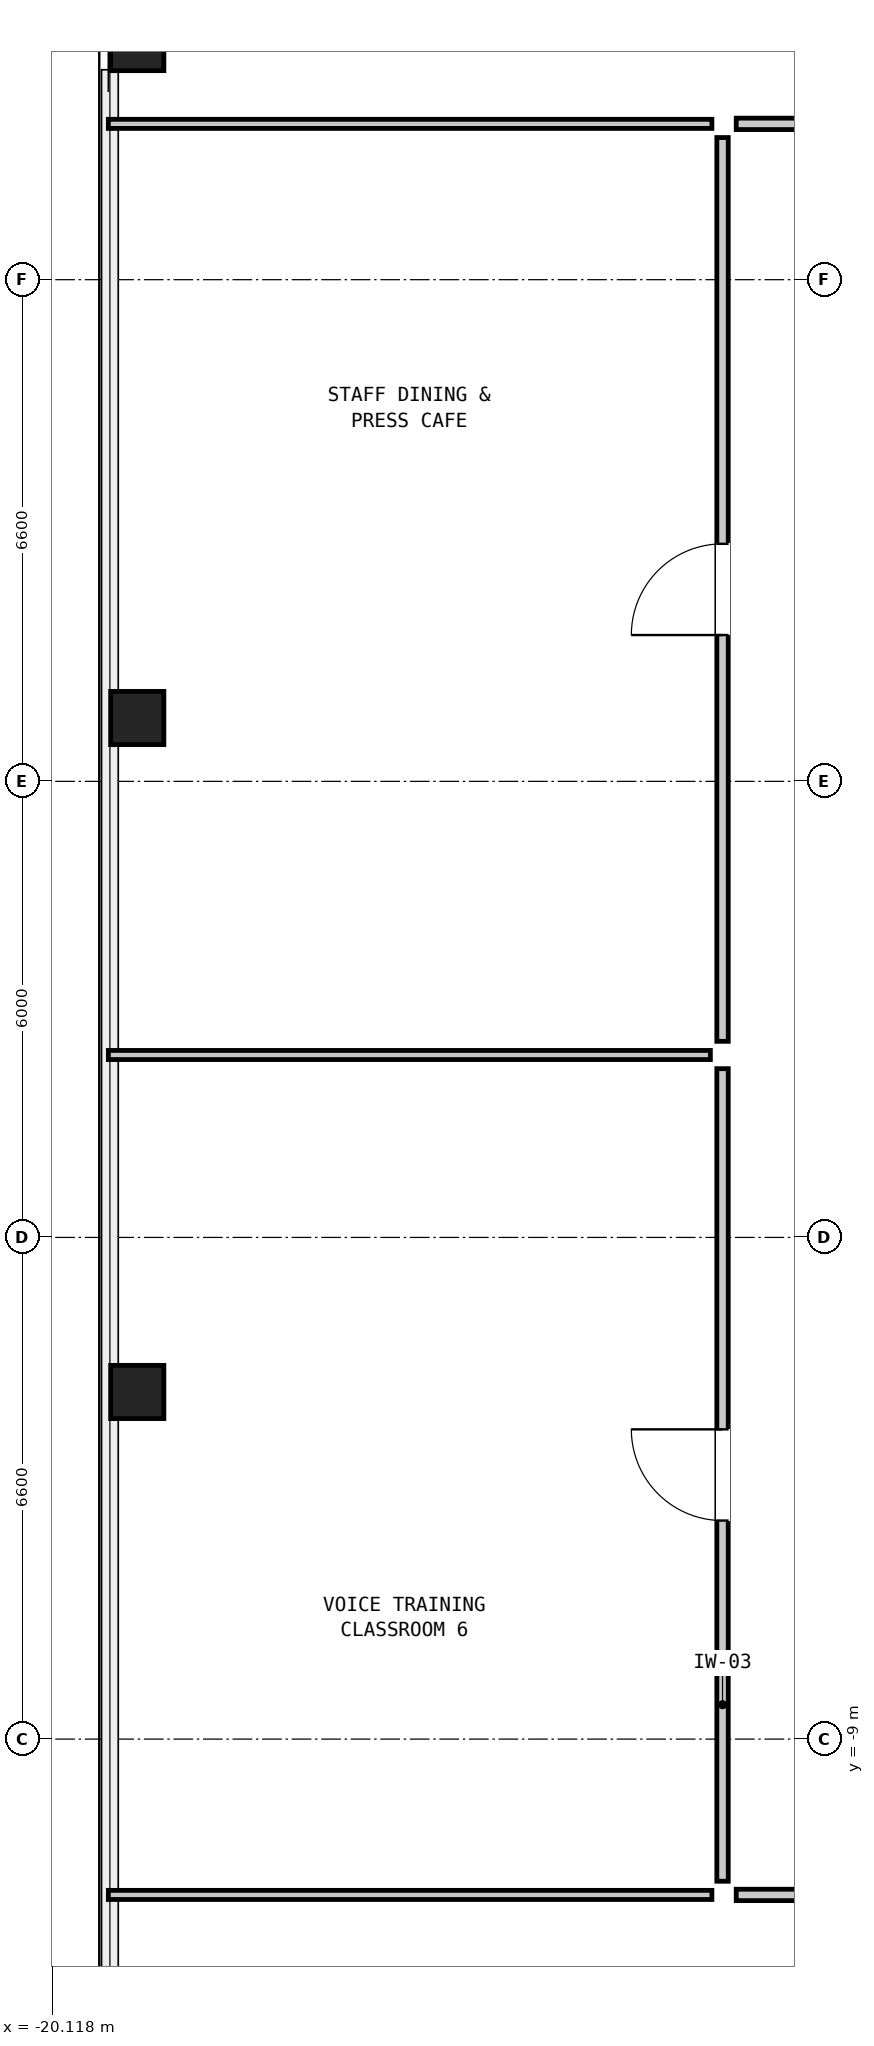
"""IFC4 building model, lengths in metres.
Left out: names, types, materials, properties, quantities, classifications, styles, units other than length and angle.
Written with IfcOpenShell. Run it as: python <this file> out.ifc"""

import sys

from ifc_helpers import new_model, si_unit, direction, frame, frame_2d, origin, origin_2d, place, context, subcontext, project, spatial, rectangle, hollow_rectangle, extrude, element, fill, save


model = new_model("IFC4")
c1 = context("Model", 3, precision=1e-05, world=origin(), true_north=direction((0.0, 1.0)))
c2 = subcontext(c1, "Body", "Model", "MODEL_VIEW")
j1 = project(units=[si_unit("LENGTHUNIT", "METRE"), si_unit("PLANEANGLEUNIT", "RADIAN")], contexts=[c1])
p1 = place(None, origin())
s1 = spatial("IfcSite", under=j1, at=p1, CompositionType="ELEMENT")
p2 = place(p1, origin())
s2 = spatial("IfcBuilding", under=s1, at=p2, CompositionType="ELEMENT")
p3 = place(p2, frame((0.0, 0.0, 226.95)))
s3 = spatial("IfcBuildingStorey", under=s2, at=p3, CompositionType="ELEMENT", Elevation=226.95)
for number, where, z_axis, x_axis in (
    (1, (-19.0, 13.3, 0.0), (0.0, 0.0, 1.0), (0.0, 1.0, 0.0)),
    (2, (-19.0, 4.433, 0.0), (0.0, 0.0, 1.0), (0.0, 1.0, 0.0)),
    (3, (-19.0, -4.433, 0.0), (0.0, 0.0, 1.0), (0.0, 1.0, 0.0)),
):
    element("IfcColumn", number, at=place(p3, frame(where, z_axis=z_axis, x_axis=x_axis)), inside=s3, PredefinedType="COLUMN", context=c2, shape_type="SweptSolid", body=[
        extrude(hollow_rectangle(XDim=0.7, YDim=0.7, WallThickness=0.045, at=origin_2d()), origin(), (0.0, 0.0, 1.0), 4.35),
    ])
p4 = place(p3, frame((-19.38, 12.25, 0.0), z_axis=(0.0, 0.0, 1.0), x_axis=(1.0, 0.0, 0.0)))
e4 = element("IfcWall", 4, at=p4, inside=s3, PredefinedType="PARTITIONING", context=c2, shape_type="SweptSolid", body=[
    extrude(rectangle(XDim=7.94, YDim=0.12, at=frame_2d((3.97, 0.0))), origin(), (0.0, 0.0, 1.0), 4.07),
])
p5 = place(p3, frame((-19.38, -11.05, 0.0), z_axis=(0.0, 0.0, 1.0), x_axis=(1.0, 0.0, 0.0)))
e5 = element("IfcWall", 5, at=p5, inside=s3, PredefinedType="PARTITIONING", context=c2, shape_type="SweptSolid", body=[
    extrude(rectangle(XDim=7.94, YDim=0.12, at=frame_2d((3.97, 0.0))), origin(), (0.0, 0.0, 1.0), 2.25),
])
p6 = place(p3, frame((-19.38, 0.0, 0.0), z_axis=(0.0, 0.0, 1.0), x_axis=(1.0, 0.0, 0.0)))
e6 = element("IfcWall", 6, at=p6, inside=s3, PredefinedType="PARTITIONING", context=c2, shape_type="SweptSolid", body=[
    extrude(rectangle(XDim=7.92, YDim=0.12, at=frame_2d((3.96, 0.0))), origin(), (0.0, 0.0, 1.0), 4.07),
])
p7 = place(p3, frame((-11.12, 12.25, 0.0), z_axis=(0.0, 0.0, 1.0), x_axis=(1.0, 0.0, 0.0)))
e7 = element("IfcWall", 7, at=p7, inside=s3, PredefinedType="PARTITIONING", context=c2, shape_type="SweptSolid", body=[
    extrude(rectangle(XDim=5.54, YDim=0.15, at=frame_2d((2.77, 0.0))), origin(), (0.0, 0.0, 1.0), 2.25),
])
p8 = place(p7, frame((1.77, 0.0, 0.0)))
e8 = element("IfcOpeningElement", 8, at=p8, cuts=e7, PredefinedType="OPENING", context=c2, shape_type="SweptSolid", body=[
    extrude(rectangle(XDim=1.2, YDim=2.1, at=frame_2d((0.6, 1.05))), frame((0.0, 0.087, 0.0), z_axis=(0.0, -1.0, 0.0), x_axis=(1.0, 0.0, 0.0)), (0.0, 0.0, 1.0), 0.174),
])
p9 = place(p3, frame((-11.12, -11.05, 0.0), z_axis=(0.0, 0.0, 1.0), x_axis=(1.0, 0.0, 0.0)))
e9 = element("IfcWall", 9, at=p9, inside=s3, PredefinedType="PARTITIONING", context=c2, shape_type="SweptSolid", body=[
    extrude(rectangle(XDim=10.94, YDim=0.15, at=frame_2d((5.47, 0.0))), origin(), (0.0, 0.0, 1.0), 2.25),
])
p10 = place(p9, frame((4.87, 0.0, 0.0)))
e10 = element("IfcOpeningElement", 10, at=p10, cuts=e9, PredefinedType="OPENING", context=c2, shape_type="SweptSolid", body=[
    extrude(rectangle(XDim=1.2, YDim=2.1, at=frame_2d((0.6, 1.05))), frame((0.0, 0.087, 0.0), z_axis=(0.0, -1.0, 0.0), x_axis=(1.0, 0.0, 0.0)), (0.0, 0.0, 1.0), 0.174),
])
p11 = place(p3, frame((-11.3, -10.87, 0.0), z_axis=(0.0, 0.0, 1.0), x_axis=(0.0, 1.0, 0.0)))
e11 = element("IfcWall", 11, at=p11, inside=s3, PredefinedType="PARTITIONING", context=c2, shape_type="SweptSolid", body=[
    extrude(rectangle(XDim=10.69, YDim=0.15, at=frame_2d((5.345, 0.0))), origin(), (0.0, 0.0, 1.0), 4.07),
])
p12 = place(p11, frame((4.745, 0.0, 0.0)))
e12 = element("IfcOpeningElement", 12, at=p12, cuts=e11, PredefinedType="OPENING", context=c2, shape_type="SweptSolid", body=[
    extrude(rectangle(XDim=1.2, YDim=2.1, at=frame_2d((0.6, 1.05))), frame((0.0, 0.087, 0.0), z_axis=(0.0, -1.0, 0.0), x_axis=(1.0, 0.0, 0.0)), (0.0, 0.0, 1.0), 0.174),
])
p13 = place(p3, frame((-11.3, 0.18, 0.0), z_axis=(0.0, 0.0, 1.0), x_axis=(0.0, 1.0, 0.0)))
e13 = element("IfcWall", 13, at=p13, inside=s3, PredefinedType="PARTITIONING", context=c2, shape_type="SweptSolid", body=[
    extrude(rectangle(XDim=11.89, YDim=0.15, at=frame_2d((5.945, 0.0))), origin(), (0.0, 0.0, 1.0), 4.07),
])
p14 = place(p13, frame((5.345, 0.0, 0.0)))
e14 = element("IfcOpeningElement", 14, at=p14, cuts=e13, PredefinedType="OPENING", context=c2, shape_type="SweptSolid", body=[
    extrude(rectangle(XDim=1.2, YDim=2.1, at=frame_2d((0.6, 1.05))), frame((0.0, 0.087, 0.0), z_axis=(0.0, -1.0, 0.0), x_axis=(1.0, 0.0, 0.0)), (0.0, 0.0, 1.0), 0.174),
])
p15 = place(p12, origin())
e15 = element("IfcDoor", 15, at=p15, inside=s3, OperationType="SINGLE_SWING_RIGHT", PredefinedType="DOOR", context=c2, shape_type="SweptSolid", body=[
    extrude(rectangle(XDim=1.2, YDim=2.1, at=frame_2d((0.6, 1.05))), frame((0.0, 0.025, 0.0), z_axis=(0.0, -1.0, 0.0), x_axis=(1.0, 0.0, 0.0)), (0.0, 0.0, 1.0), 0.05),
])
fill(e12, e15)
p16 = place(p14, origin())
e16 = element("IfcDoor", 16, at=p16, inside=s3, OperationType="SINGLE_SWING_LEFT", PredefinedType="DOOR", context=c2, shape_type="SweptSolid", body=[
    extrude(rectangle(XDim=1.2, YDim=2.1, at=frame_2d((0.6, 1.05))), frame((0.0, 0.025, 0.0), z_axis=(0.0, -1.0, 0.0), x_axis=(1.0, 0.0, 0.0)), (0.0, 0.0, 1.0), 0.05),
])
fill(e14, e16)
save(model, sys.argv[1])
